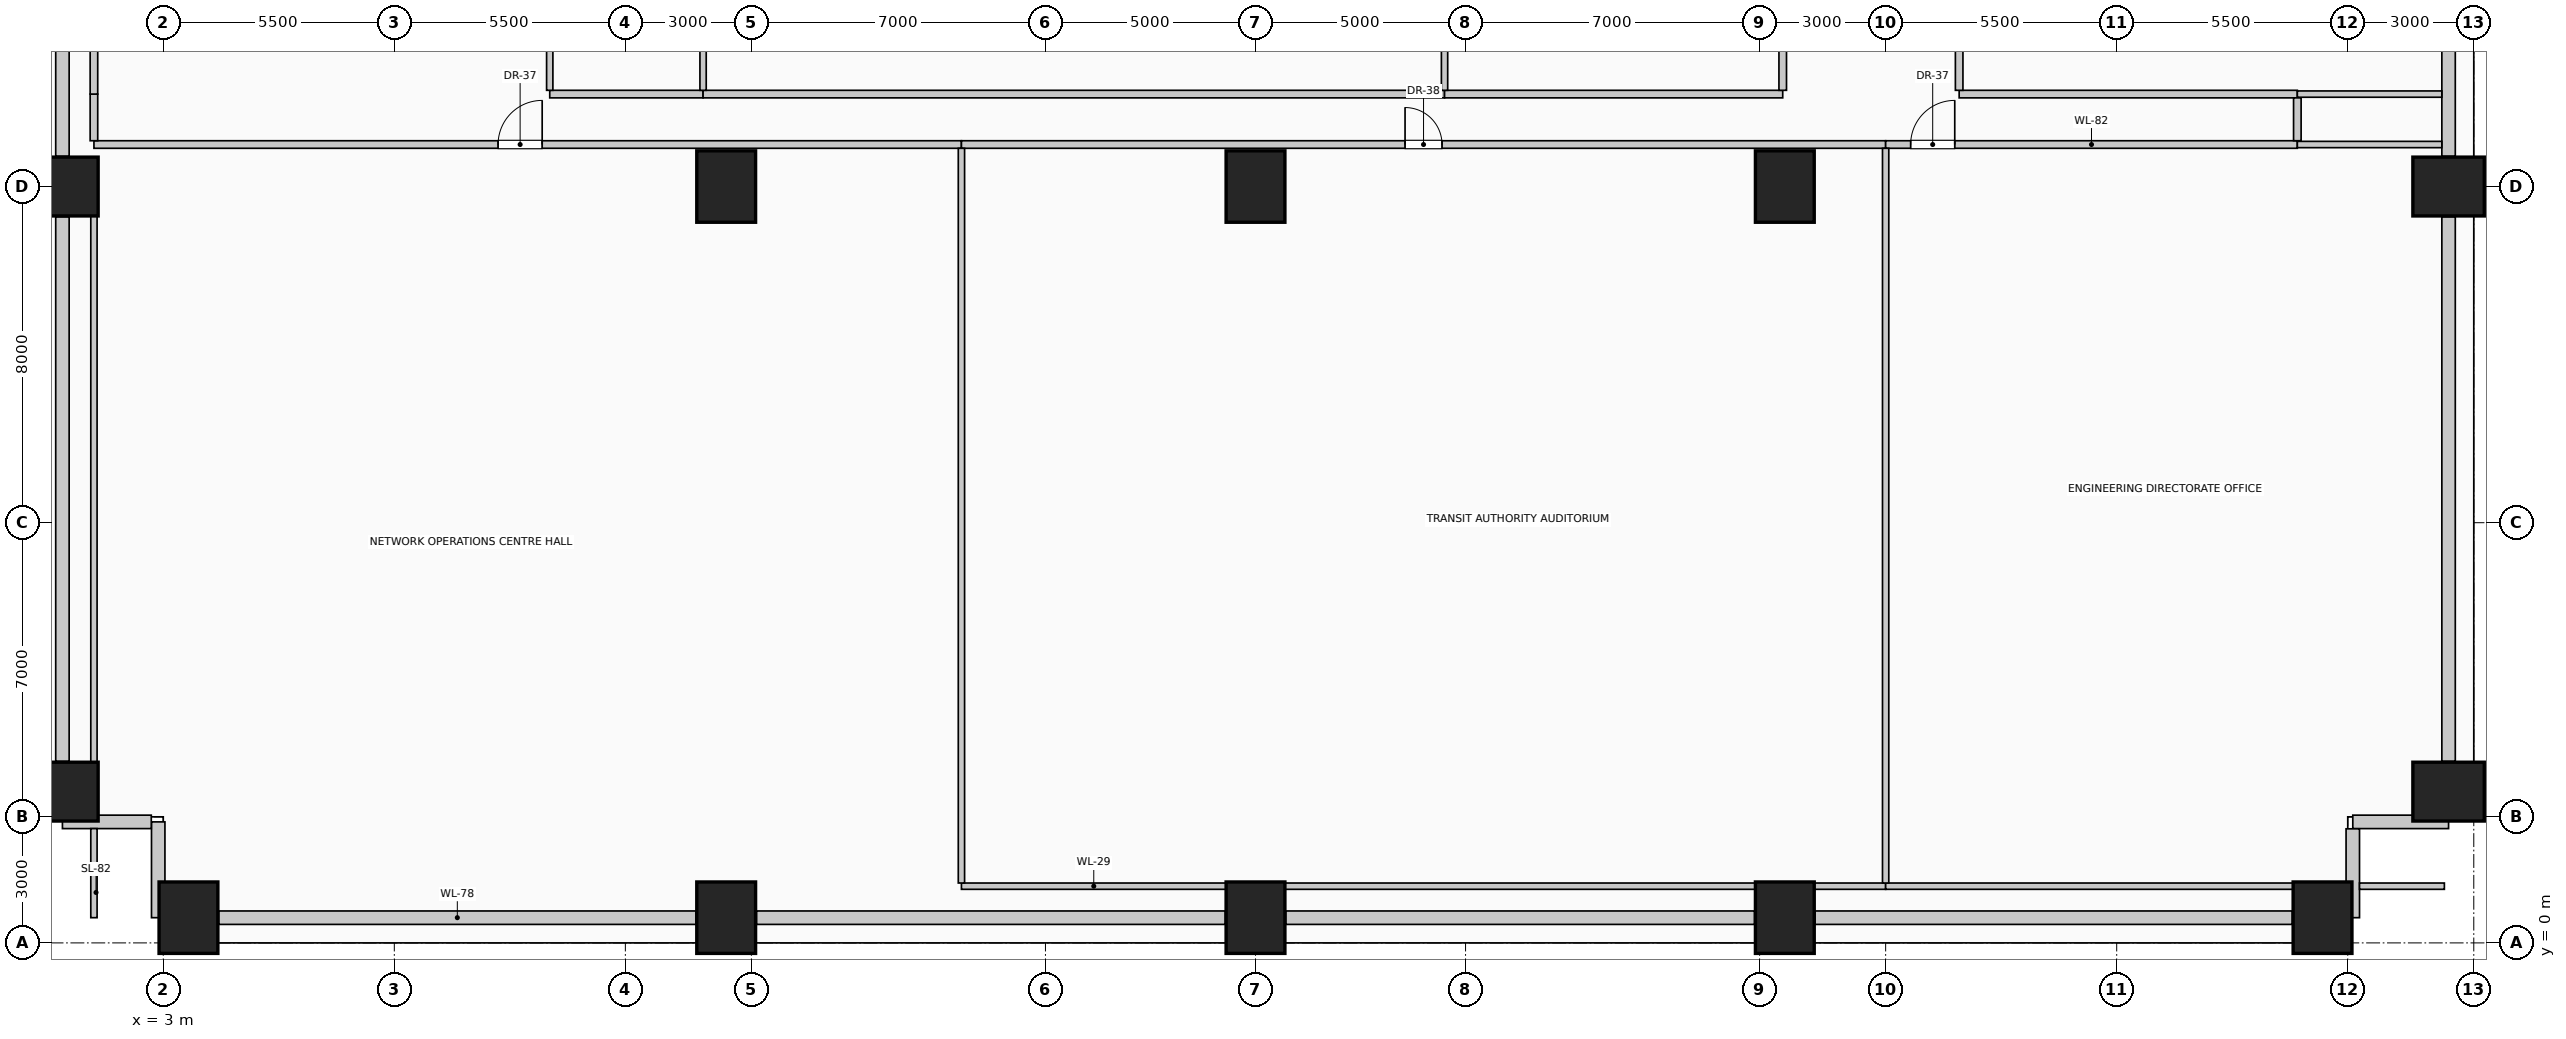
"""IFC4 building model, lengths in metres.
Left out: names, types, materials, properties, quantities, classifications, styles, units other than length and angle.
Written with IfcOpenShell. Run it as: python <this file> out.ifc"""

import sys

from ifc_helpers import new_model, si_unit, direction, frame, frame_2d, origin, origin_2d, place, context, subcontext, project, spatial, rectangle, extrude, element, fill, save


model = new_model("IFC4")
c1 = context("Model", 3, precision=1e-05, world=origin(), true_north=direction((0.0, 1.0)))
c2 = subcontext(c1, "Body", "Model", "MODEL_VIEW")
j1 = project(units=[si_unit("LENGTHUNIT", "METRE"), si_unit("PLANEANGLEUNIT", "RADIAN")], contexts=[c1])
p1 = place(None, origin())
s1 = spatial("IfcSite", under=j1, at=p1, CompositionType="ELEMENT")
p2 = place(p1, origin())
s2 = spatial("IfcBuilding", under=s1, at=p2, CompositionType="ELEMENT")
p3 = place(p2, frame((0.0, 0.0, 17.55)))
s3 = spatial("IfcBuildingStorey", under=s2, at=p3, CompositionType="ELEMENT", Elevation=17.55)
for number, where, z_axis, x_axis in (
    (1, (3.6, 0.6, 0.0), (0.0, 0.0, 1.0), (1.0, 0.0, 0.0)),
    (2, (16.4, 0.6, 0.0), (0.0, 0.0, 1.0), (1.0, 0.0, 0.0)),
    (3, (29.0, 0.6, 0.0), (0.0, 0.0, 1.0), (1.0, 0.0, 0.0)),
    (4, (41.6, 0.6, 0.0), (0.0, 0.0, 1.0), (1.0, 0.0, 0.0)),
    (5, (54.4, 0.6, 0.0), (0.0, 0.0, 1.0), (1.0, 0.0, 0.0)),
    (6, (0.6, 3.6, 0.0), (0.0, 0.0, 1.0), (0.0, 1.0, 0.0)),
    (7, (57.4, 3.6, 0.0), (0.0, 0.0, 1.0), (0.0, 1.0, 0.0)),
    (8, (0.6, 18.0, 0.0), (0.0, 0.0, 1.0), (0.0, 1.0, 0.0)),
    (9, (57.4, 18.0, 0.0), (0.0, 0.0, 1.0), (0.0, 1.0, 0.0)),
    (10, (16.4, 18.0, 0.0), (0.0, 0.0, 1.0), (1.0, 0.0, 0.0)),
    (11, (29.0, 18.0, 0.0), (0.0, 0.0, 1.0), (1.0, 0.0, 0.0)),
    (12, (41.6, 18.0, 0.0), (0.0, 0.0, 1.0), (1.0, 0.0, 0.0)),
):
    element("IfcColumn", number, at=place(p3, frame(where, z_axis=z_axis, x_axis=x_axis)), inside=s3, PredefinedType="COLUMN", context=c2, shape_type="SweptSolid", body=[
        extrude(rectangle(XDim=1.4, YDim=1.7, at=origin_2d()), origin(), (0.0, 0.0, 1.0), 5.05),
    ])
p4 = place(p3, frame((15.68, 0.6, 0.0), z_axis=(0.0, 0.0, 1.0), x_axis=(-1.0, 0.0, 0.0)))
e13 = element("IfcWall", 13, at=p4, inside=s3, PredefinedType="SOLIDWALL", context=c2, shape_type="SweptSolid", body=[
    extrude(rectangle(XDim=11.36, YDim=0.32, at=frame_2d((5.68, 0.0))), origin(), (0.0, 0.0, 1.0), 3.15),
])
for number, where, z_axis, x_axis in (
    (14, (28.28, 0.6, 0.0), (0.0, 0.0, 1.0), (-1.0, 0.0, 0.0)),
    (15, (40.88, 0.6, 0.0), (0.0, 0.0, 1.0), (-1.0, 0.0, 0.0)),
):
    element("IfcWall", number, at=place(p3, frame(where, z_axis=z_axis, x_axis=x_axis)), inside=s3, PredefinedType="SOLIDWALL", context=c2, shape_type="SweptSolid", body=[
        extrude(rectangle(XDim=11.16, YDim=0.32, at=frame_2d((5.58, 0.0))), origin(), (0.0, 0.0, 1.0), 3.15),
    ])
p5 = place(p3, frame((53.68, 0.6, 0.0), z_axis=(0.0, 0.0, 1.0), x_axis=(-1.0, 0.0, 0.0)))
e16 = element("IfcWall", 16, at=p5, inside=s3, PredefinedType="SOLIDWALL", context=c2, shape_type="SweptSolid", body=[
    extrude(rectangle(XDim=11.36, YDim=0.32, at=frame_2d((5.68, 0.0))), origin(), (0.0, 0.0, 1.0), 3.15),
])
p6 = place(p3, frame((0.6, 4.32, 0.0), z_axis=(0.0, 0.0, 1.0), x_axis=(0.0, 1.0, 0.0)))
e17 = element("IfcWall", 17, at=p6, inside=s3, PredefinedType="SOLIDWALL", context=c2, shape_type="SweptSolid", body=[
    extrude(rectangle(XDim=12.96, YDim=0.32, at=frame_2d((6.48, 0.0))), origin(), (0.0, 0.0, 1.0), 3.15),
])
p7 = place(p3, frame((0.6, 18.72, 0.0), z_axis=(0.0, 0.0, 1.0), x_axis=(0.0, 1.0, 0.0)))
e18 = element("IfcWall", 18, at=p7, inside=s3, PredefinedType="SOLIDWALL", context=c2, shape_type="SweptSolid", body=[
    extrude(rectangle(XDim=14.56, YDim=0.32, at=frame_2d((7.28, 0.0))), origin(), (0.0, 0.0, 1.0), 3.15),
])
p8 = place(p3, frame((57.4, 17.28, 0.0), z_axis=(0.0, 0.0, 1.0), x_axis=(0.0, -1.0, 0.0)))
e19 = element("IfcWall", 19, at=p8, inside=s3, PredefinedType="SOLIDWALL", context=c2, shape_type="SweptSolid", body=[
    extrude(rectangle(XDim=12.96, YDim=0.32, at=frame_2d((6.48, 0.0))), origin(), (0.0, 0.0, 1.0), 3.15),
])
p9 = place(p3, frame((57.4, 33.28, 0.0), z_axis=(0.0, 0.0, 1.0), x_axis=(0.0, -1.0, 0.0)))
e20 = element("IfcWall", 20, at=p9, inside=s3, PredefinedType="SOLIDWALL", context=c2, shape_type="SweptSolid", body=[
    extrude(rectangle(XDim=14.56, YDim=0.32, at=frame_2d((7.28, 0.0))), origin(), (0.0, 0.0, 1.0), 3.15),
])
p10 = place(p3, frame((57.4, 2.88, 0.0), z_axis=(0.0, 0.0, 1.0), x_axis=(-1.0, 0.0, 0.0)))
e21 = element("IfcWall", 21, at=p10, inside=s3, PredefinedType="SOLIDWALL", context=c2, shape_type="SweptSolid", body=[
    extrude(rectangle(XDim=2.28, YDim=0.32, at=frame_2d((1.14, 0.0))), origin(), (0.0, 0.0, 1.0), 3.15),
])
p11 = place(p3, frame((55.12, 2.715, 0.0), z_axis=(0.0, 0.0, 1.0), x_axis=(0.0, -1.0, 0.0)))
e22 = element("IfcWall", 22, at=p11, inside=s3, PredefinedType="SOLIDWALL", context=c2, shape_type="SweptSolid", body=[
    extrude(rectangle(XDim=2.115, YDim=0.32, at=frame_2d((1.058, 0.0))), origin(), (0.0, 0.0, 1.0), 4.75),
])
p12 = place(p3, frame((2.88, 0.6, 0.0), z_axis=(0.0, 0.0, 1.0), x_axis=(0.0, 1.0, 0.0)))
e23 = element("IfcWall", 23, at=p12, inside=s3, PredefinedType="SOLIDWALL", context=c2, shape_type="SweptSolid", body=[
    extrude(rectangle(XDim=2.28, YDim=0.32, at=frame_2d((1.14, 0.0))), origin(), (0.0, 0.0, 1.0), 4.75),
])
p13 = place(p3, frame((2.715, 2.88, 0.0), z_axis=(0.0, 0.0, 1.0), x_axis=(-1.0, 0.0, 0.0)))
e24 = element("IfcWall", 24, at=p13, inside=s3, PredefinedType="SOLIDWALL", context=c2, shape_type="SweptSolid", body=[
    extrude(rectangle(XDim=2.115, YDim=0.32, at=frame_2d((1.058, 0.0))), origin(), (0.0, 0.0, 1.0), 3.15),
])
p14 = place(p3, frame((22.0, 1.35, 0.0), z_axis=(0.0, 0.0, 1.0), x_axis=(1.0, 0.0, 0.0)))
e25 = element("IfcWall", 25, at=p14, inside=s3, PredefinedType="PARTITIONING", context=c2, shape_type="SweptSolid", body=[
    extrude(rectangle(XDim=6.3, YDim=0.15, at=frame_2d((3.15, 0.0))), origin(), (0.0, 0.0, 1.0), 3.145),
])
p15 = place(p3, frame((29.7, 1.35, 0.0), z_axis=(0.0, 0.0, 1.0), x_axis=(1.0, 0.0, 0.0)))
e26 = element("IfcWall", 26, at=p15, inside=s3, PredefinedType="PARTITIONING", context=c2, shape_type="SweptSolid", body=[
    extrude(rectangle(XDim=11.2, YDim=0.15, at=frame_2d((5.6, 0.0))), origin(), (0.0, 0.0, 1.0), 3.145),
])
p16 = place(p3, frame((42.3, 1.35, 0.0), z_axis=(0.0, 0.0, 1.0), x_axis=(1.0, 0.0, 0.0)))
e27 = element("IfcWall", 27, at=p16, inside=s3, PredefinedType="PARTITIONING", context=c2, shape_type="SweptSolid", body=[
    extrude(rectangle(XDim=1.7, YDim=0.15, at=frame_2d((0.85, 0.0))), origin(), (0.0, 0.0, 1.0), 3.145),
])
p17 = place(p3, frame((44.0, 1.35, 0.0), z_axis=(0.0, 0.0, 1.0), x_axis=(1.0, 0.0, 0.0)))
e28 = element("IfcWall", 28, at=p17, inside=s3, PredefinedType="PARTITIONING", context=c2, shape_type="SweptSolid", body=[
    extrude(rectangle(XDim=9.7, YDim=0.15, at=frame_2d((4.85, 0.0))), origin(), (0.0, 0.0, 1.0), 3.145),
])
p18 = place(p3, frame((55.28, 1.35, 0.0), z_axis=(0.0, 0.0, 1.0), x_axis=(1.0, 0.0, 0.0)))
e29 = element("IfcWall", 29, at=p18, inside=s3, PredefinedType="PARTITIONING", context=c2, shape_type="SweptSolid", body=[
    extrude(rectangle(XDim=2.02, YDim=0.15, at=frame_2d((1.01, 0.0))), origin(), (0.0, 0.0, 1.0), 4.75),
])
p19 = place(p3, frame((1.35, 19.0, 0.0), z_axis=(0.0, 0.0, 1.0), x_axis=(1.0, 0.0, 0.0)))
e30 = element("IfcWall", 30, at=p19, inside=s3, PredefinedType="PARTITIONING", context=c2, shape_type="SweptSolid", body=[
    extrude(rectangle(XDim=20.65, YDim=0.18, at=frame_2d((10.325, 0.0))), origin(), (0.0, 0.0, 1.0), 4.75),
])
p20 = place(p19, frame((9.62, 0.0, 0.0)))
e31 = element("IfcOpeningElement", 31, at=p20, cuts=e30, PredefinedType="OPENING", context=c2, shape_type="SweptSolid", body=[
    extrude(rectangle(XDim=1.05, YDim=2.15, at=frame_2d((0.525, 1.075))), frame((0.0, 0.1, 0.0), z_axis=(0.0, -1.0, 0.0), x_axis=(1.0, 0.0, 0.0)), (0.0, 0.0, 1.0), 0.2),
])
p21 = place(p3, frame((22.0, 19.0, 0.0), z_axis=(0.0, 0.0, 1.0), x_axis=(1.0, 0.0, 0.0)))
e32 = element("IfcWall", 32, at=p21, inside=s3, PredefinedType="PARTITIONING", context=c2, shape_type="SweptSolid", body=[
    extrude(rectangle(XDim=22.0, YDim=0.18, at=frame_2d((11.0, 0.0))), origin(), (0.0, 0.0, 1.0), 4.75),
])
p22 = place(p21, frame((10.56, 0.0, 0.0)))
e33 = element("IfcOpeningElement", 33, at=p22, cuts=e32, PredefinedType="OPENING", context=c2, shape_type="SweptSolid", body=[
    extrude(rectangle(XDim=0.88, YDim=2.1, at=frame_2d((0.44, 1.05))), frame((0.0, 0.1, 0.0), z_axis=(0.0, -1.0, 0.0), x_axis=(1.0, 0.0, 0.0)), (0.0, 0.0, 1.0), 0.2),
])
p23 = place(p3, frame((44.0, 19.0, 0.0), z_axis=(0.0, 0.0, 1.0), x_axis=(1.0, 0.0, 0.0)))
e34 = element("IfcWall", 34, at=p23, inside=s3, PredefinedType="PARTITIONING", context=c2, shape_type="SweptSolid", body=[
    extrude(rectangle(XDim=9.8, YDim=0.18, at=frame_2d((4.9, 0.0))), origin(), (0.0, 0.0, 1.0), 4.75),
])
p24 = place(p23, frame((0.595, 0.0, 0.0)))
e35 = element("IfcOpeningElement", 35, at=p24, cuts=e34, PredefinedType="OPENING", context=c2, shape_type="SweptSolid", body=[
    extrude(rectangle(XDim=1.05, YDim=2.15, at=frame_2d((0.525, 1.075))), frame((0.0, 0.1, 0.0), z_axis=(0.0, -1.0, 0.0), x_axis=(1.0, 0.0, 0.0)), (0.0, 0.0, 1.0), 0.2),
])
p25 = place(p3, frame((53.8, 19.0, 0.0), z_axis=(0.0, 0.0, 1.0), x_axis=(1.0, 0.0, 0.0)))
e36 = element("IfcWall", 36, at=p25, inside=s3, PredefinedType="PARTITIONING", context=c2, shape_type="SweptSolid", body=[
    extrude(rectangle(XDim=3.44, YDim=0.15, at=frame_2d((1.72, 0.0))), origin(), (0.0, 0.0, 1.0), 4.75),
])
p26 = place(p3, frame((12.2, 20.2, 0.0), z_axis=(0.0, 0.0, 1.0), x_axis=(1.0, 0.0, 0.0)))
e37 = element("IfcWall", 37, at=p26, inside=s3, PredefinedType="PARTITIONING", context=c2, shape_type="SweptSolid", body=[
    extrude(rectangle(XDim=3.65, YDim=0.18, at=frame_2d((1.825, 0.0))), origin(), (0.0, 0.0, 1.0), 4.75),
])
p27 = place(p3, frame((15.85, 20.2, 0.0), z_axis=(0.0, 0.0, 1.0), x_axis=(1.0, 0.0, 0.0)))
e38 = element("IfcWall", 38, at=p27, inside=s3, PredefinedType="PARTITIONING", context=c2, shape_type="SweptSolid", body=[
    extrude(rectangle(XDim=17.65, YDim=0.18, at=frame_2d((8.825, 0.0))), origin(), (0.0, 0.0, 1.0), 4.75),
])
for number, where, z_axis, x_axis in (
    (39, (33.5, 20.2, 0.0), (0.0, 0.0, 1.0), (1.0, 0.0, 0.0)),
    (40, (45.75, 20.2, 0.0), (0.0, 0.0, 1.0), (1.0, 0.0, 0.0)),
):
    element("IfcWall", number, at=place(p3, frame(where, z_axis=z_axis, x_axis=x_axis)), inside=s3, PredefinedType="PARTITIONING", context=c2, shape_type="SweptSolid", body=[
        extrude(rectangle(XDim=8.05, YDim=0.18, at=frame_2d((4.025, 0.0))), origin(), (0.0, 0.0, 1.0), 4.75),
    ])
p28 = place(p3, frame((53.8, 20.2, 0.0), z_axis=(0.0, 0.0, 1.0), x_axis=(1.0, 0.0, 0.0)))
e41 = element("IfcWall", 41, at=p28, inside=s3, PredefinedType="PARTITIONING", context=c2, shape_type="SweptSolid", body=[
    extrude(rectangle(XDim=3.44, YDim=0.15, at=frame_2d((1.72, 0.0))), origin(), (0.0, 0.0, 1.0), 4.75),
])
p29 = place(p3, frame((1.35, 0.6, 0.0), z_axis=(0.0, 0.0, 1.0), x_axis=(0.0, 1.0, 0.0)))
e42 = element("IfcWall", 42, at=p29, inside=s3, PredefinedType="PARTITIONING", context=c2, shape_type="SweptSolid", body=[
    extrude(rectangle(XDim=2.12, YDim=0.15, at=frame_2d((1.06, 0.0))), origin(), (0.0, 0.0, 1.0), 4.75),
])
p30 = place(p3, frame((1.35, 4.3, 0.0), z_axis=(0.0, 0.0, 1.0), x_axis=(0.0, 1.0, 0.0)))
e43 = element("IfcWall", 43, at=p30, inside=s3, PredefinedType="PARTITIONING", context=c2, shape_type="SweptSolid", body=[
    extrude(rectangle(XDim=13.0, YDim=0.15, at=frame_2d((6.5, 0.0))), origin(), (0.0, 0.0, 1.0), 3.145),
])
p31 = place(p3, frame((1.35, 19.09, 0.0), z_axis=(0.0, 0.0, 1.0), x_axis=(0.0, 1.0, 0.0)))
e44 = element("IfcWall", 44, at=p31, inside=s3, PredefinedType="PARTITIONING", context=c2, shape_type="SweptSolid", body=[
    extrude(rectangle(XDim=1.11, YDim=0.18, at=frame_2d((0.555, 0.0))), origin(), (0.0, 0.0, 1.0), 3.145),
])
p32 = place(p3, frame((1.35, 20.2, 0.0), z_axis=(0.0, 0.0, 1.0), x_axis=(0.0, 1.0, 0.0)))
e45 = element("IfcWall", 45, at=p32, inside=s3, PredefinedType="PARTITIONING", context=c2, shape_type="SweptSolid", body=[
    extrude(rectangle(XDim=13.1, YDim=0.18, at=frame_2d((6.55, 0.0))), origin(), (0.0, 0.0, 1.0), 3.145),
])
p33 = place(p3, frame((12.2, 20.29, 0.0), z_axis=(0.0, 0.0, 1.0), x_axis=(0.0, 1.0, 0.0)))
e46 = element("IfcWall", 46, at=p33, inside=s3, PredefinedType="PARTITIONING", context=c2, shape_type="SweptSolid", body=[
    extrude(rectangle(XDim=1.81, YDim=0.15, at=frame_2d((0.905, 0.0))), origin(), (0.0, 0.0, 1.0), 4.75),
])
p34 = place(p3, frame((15.85, 20.29, 0.0), z_axis=(0.0, 0.0, 1.0), x_axis=(0.0, 1.0, 0.0)))
e47 = element("IfcWall", 47, at=p34, inside=s3, PredefinedType="PARTITIONING", context=c2, shape_type="SweptSolid", body=[
    extrude(rectangle(XDim=4.51, YDim=0.15, at=frame_2d((2.255, 0.0))), origin(), (0.0, 0.0, 1.0), 3.145),
])
p35 = place(p3, frame((22.0, 1.425, 0.0), z_axis=(0.0, 0.0, 1.0), x_axis=(0.0, 1.0, 0.0)))
e48 = element("IfcWall", 48, at=p35, inside=s3, PredefinedType="PARTITIONING", context=c2, shape_type="SweptSolid", body=[
    extrude(rectangle(XDim=17.485, YDim=0.15, at=frame_2d((8.742, 0.0))), origin(), (0.0, 0.0, 1.0), 4.75),
])
p36 = place(p3, frame((33.5, 20.29, 0.0), z_axis=(0.0, 0.0, 1.0), x_axis=(0.0, 1.0, 0.0)))
e49 = element("IfcWall", 49, at=p36, inside=s3, PredefinedType="PARTITIONING", context=c2, shape_type="SweptSolid", body=[
    extrude(rectangle(XDim=13.91, YDim=0.15, at=frame_2d((6.955, 0.0))), origin(), (0.0, 0.0, 1.0), 4.75),
])
p37 = place(p3, frame((41.55, 20.29, 0.0), z_axis=(0.0, 0.0, 1.0), x_axis=(0.0, 1.0, 0.0)))
e50 = element("IfcWall", 50, at=p37, inside=s3, PredefinedType="PARTITIONING", context=c2, shape_type="SweptSolid", body=[
    extrude(rectangle(XDim=12.06, YDim=0.18, at=frame_2d((6.03, 0.0))), origin(), (0.0, 0.0, 1.0), 3.145),
])
p38 = place(p37, frame((5.505, 0.0, 0.0)))
e51 = element("IfcOpeningElement", 51, at=p38, cuts=e50, PredefinedType="OPENING", context=c2, shape_type="SweptSolid", body=[
    extrude(rectangle(XDim=1.05, YDim=2.15, at=frame_2d((0.525, 1.075))), frame((0.0, 0.1, 0.0), z_axis=(0.0, -1.0, 0.0), x_axis=(1.0, 0.0, 0.0)), (0.0, 0.0, 1.0), 0.2),
])
p39 = place(p3, frame((44.0, 1.425, 0.0), z_axis=(0.0, 0.0, 1.0), x_axis=(0.0, 1.0, 0.0)))
e52 = element("IfcWall", 52, at=p39, inside=s3, PredefinedType="PARTITIONING", context=c2, shape_type="SweptSolid", body=[
    extrude(rectangle(XDim=17.485, YDim=0.15, at=frame_2d((8.742, 0.0))), origin(), (0.0, 0.0, 1.0), 4.75),
])
p40 = place(p3, frame((45.75, 20.29, 0.0), z_axis=(0.0, 0.0, 1.0), x_axis=(0.0, 1.0, 0.0)))
e53 = element("IfcWall", 53, at=p40, inside=s3, PredefinedType="PARTITIONING", context=c2, shape_type="SweptSolid", body=[
    extrude(rectangle(XDim=11.985, YDim=0.18, at=frame_2d((5.992, 0.0))), origin(), (0.0, 0.0, 1.0), 4.75),
])
p41 = place(p3, frame((53.8, 19.09, 0.0), z_axis=(0.0, 0.0, 1.0), x_axis=(0.0, 1.0, 0.0)))
e54 = element("IfcWall", 54, at=p41, inside=s3, PredefinedType="PARTITIONING", context=c2, shape_type="SweptSolid", body=[
    extrude(rectangle(XDim=1.02, YDim=0.18, at=frame_2d((0.51, 0.0))), origin(), (0.0, 0.0, 1.0), 4.75),
])
p42 = place(p20, origin())
e55 = element("IfcDoor", 55, at=p42, inside=s3, OperationType="SINGLE_SWING_RIGHT", PredefinedType="DOOR", context=c2, shape_type="SweptSolid", body=[
    extrude(rectangle(XDim=1.05, YDim=2.15, at=frame_2d((0.525, 1.075))), frame((0.0, 0.025, 0.0), z_axis=(0.0, -1.0, 0.0), x_axis=(1.0, 0.0, 0.0)), (0.0, 0.0, 1.0), 0.05),
])
fill(e31, e55)
p43 = place(p24, origin())
e56 = element("IfcDoor", 56, at=p43, inside=s3, OperationType="SINGLE_SWING_RIGHT", PredefinedType="DOOR", context=c2, shape_type="SweptSolid", body=[
    extrude(rectangle(XDim=1.05, YDim=2.15, at=frame_2d((0.525, 1.075))), frame((0.0, 0.025, 0.0), z_axis=(0.0, -1.0, 0.0), x_axis=(1.0, 0.0, 0.0)), (0.0, 0.0, 1.0), 0.05),
])
fill(e35, e56)
p44 = place(p22, origin())
e57 = element("IfcDoor", 57, at=p44, inside=s3, OperationType="SINGLE_SWING_LEFT", PredefinedType="DOOR", context=c2, shape_type="SweptSolid", body=[
    extrude(rectangle(XDim=0.88, YDim=2.1, at=frame_2d((0.44, 1.05))), frame((0.0, 0.025, 0.0), z_axis=(0.0, -1.0, 0.0), x_axis=(1.0, 0.0, 0.0)), (0.0, 0.0, 1.0), 0.05),
])
fill(e33, e57)
save(model, sys.argv[1])
